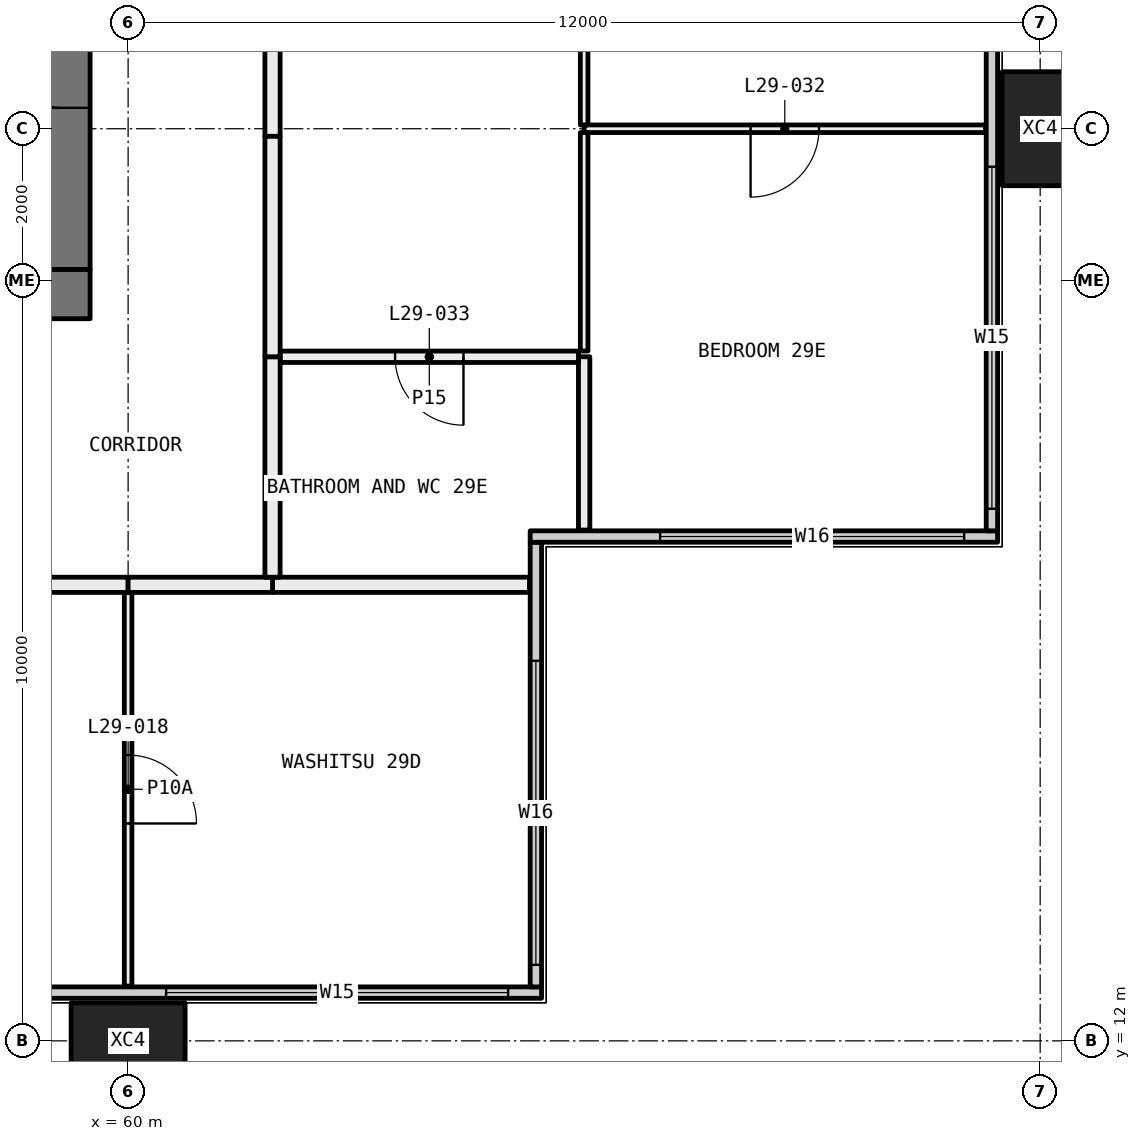
"""IFC4 building model, lengths in metres.
Left out: names, types, materials, properties, quantities, classifications, styles, units other than length and angle.
Written with IfcOpenShell. Run it as: python <this file> out.ifc"""

import sys

from ifc_helpers import new_model, si_unit, direction, frame, frame_2d, origin, origin_2d, place, context, subcontext, project, spatial, rectangle, hollow_rectangle, extrude, element, fill, save


model = new_model("IFC4")
c1 = context("Model", 3, precision=1e-05, world=origin(), true_north=direction((0.0, 1.0)))
c2 = subcontext(c1, "Body", "Model", "MODEL_VIEW")
j1 = project(units=[si_unit("LENGTHUNIT", "METRE"), si_unit("PLANEANGLEUNIT", "RADIAN")], contexts=[c1])
p1 = place(None, origin())
s1 = spatial("IfcSite", under=j1, at=p1, CompositionType="ELEMENT")
p2 = place(p1, origin())
s2 = spatial("IfcBuilding", under=s1, at=p2, CompositionType="ELEMENT")
p3 = place(p2, frame((0.0, 0.0, 113.85)))
s3 = spatial("IfcBuildingStorey", under=s2, at=p3, CompositionType="ELEMENT", Elevation=113.85)
for number, where, z_axis, x_axis in (
    (1, (60.0, 12.0, -0.4), (0.0, 0.0, 1.0), (1.0, 0.0, 0.0)),
    (2, (72.0, 24.0, -0.4), (0.0, 0.0, 1.0), (0.0, 1.0, 0.0)),
):
    element("IfcColumn", number, at=place(p3, frame(where, z_axis=z_axis, x_axis=x_axis)), inside=s3, PredefinedType="COLUMN", context=c2, shape_type="SweptSolid", body=[
        extrude(hollow_rectangle(XDim=1.5, YDim=1.0, WallThickness=0.06, at=origin_2d()), origin(), (0.0, 0.0, 1.0), 3.45),
    ])
p4 = place(p3, frame((6.56, 12.635, 0.0), z_axis=(0.0, 0.0, 1.0), x_axis=(1.0, 0.0, 0.0)))
e3 = element("IfcWall", 3, at=p4, inside=s3, PredefinedType="ELEMENTEDWALL", context=c2, shape_type="SweptSolid", body=[
    extrude(rectangle(XDim=58.88, YDim=0.15, at=frame_2d((29.44, 0.0))), origin(), (0.0, 0.0, 1.0), 3.05),
])
p5 = place(p4, frame((0.44, 0.0, 0.45)))
e4 = element("IfcOpeningElement", 4, at=p5, cuts=e3, PredefinedType="OPENING", context=c2, shape_type="SweptSolid", body=[
    extrude(rectangle(XDim=4.5, YDim=2.55, at=frame_2d((2.25, 1.275))), frame((0.0, 0.085, 0.0), z_axis=(0.0, -1.0, 0.0), x_axis=(1.0, 0.0, 0.0)), (0.0, 0.0, 1.0), 0.17),
])
p6 = place(p4, frame((8.19, 0.0, 0.45)))
e5 = element("IfcOpeningElement", 5, at=p6, cuts=e3, PredefinedType="OPENING", context=c2, shape_type="SweptSolid", body=[
    extrude(rectangle(XDim=2.75, YDim=2.55, at=frame_2d((1.375, 1.275))), frame((0.0, 0.085, 0.0), z_axis=(0.0, -1.0, 0.0), x_axis=(1.0, 0.0, 0.0)), (0.0, 0.0, 1.0), 0.17),
])
p7 = place(p4, frame((11.94, 0.0, 0.45)))
e6 = element("IfcOpeningElement", 6, at=p7, cuts=e3, PredefinedType="OPENING", context=c2, shape_type="SweptSolid", body=[
    extrude(rectangle(XDim=2.75, YDim=2.55, at=frame_2d((1.375, 1.275))), frame((0.0, 0.085, 0.0), z_axis=(0.0, -1.0, 0.0), x_axis=(1.0, 0.0, 0.0)), (0.0, 0.0, 1.0), 0.17),
])
p8 = place(p4, frame((20.19, 0.0, 0.45)))
e7 = element("IfcOpeningElement", 7, at=p8, cuts=e3, PredefinedType="OPENING", context=c2, shape_type="SweptSolid", body=[
    extrude(rectangle(XDim=2.75, YDim=2.55, at=frame_2d((1.375, 1.275))), frame((0.0, 0.085, 0.0), z_axis=(0.0, -1.0, 0.0), x_axis=(1.0, 0.0, 0.0)), (0.0, 0.0, 1.0), 0.17),
])
p9 = place(p4, frame((23.94, 0.0, 0.45)))
e8 = element("IfcOpeningElement", 8, at=p9, cuts=e3, PredefinedType="OPENING", context=c2, shape_type="SweptSolid", body=[
    extrude(rectangle(XDim=2.0, YDim=2.55, at=frame_2d((1.0, 1.275))), frame((0.0, 0.085, 0.0), z_axis=(0.0, -1.0, 0.0), x_axis=(1.0, 0.0, 0.0)), (0.0, 0.0, 1.0), 0.17),
])
p10 = place(p4, frame((32.19, 0.0, 0.45)))
e9 = element("IfcOpeningElement", 9, at=p10, cuts=e3, PredefinedType="OPENING", context=c2, shape_type="SweptSolid", body=[
    extrude(rectangle(XDim=2.75, YDim=2.55, at=frame_2d((1.375, 1.275))), frame((0.0, 0.085, 0.0), z_axis=(0.0, -1.0, 0.0), x_axis=(1.0, 0.0, 0.0)), (0.0, 0.0, 1.0), 0.17),
])
p11 = place(p4, frame((35.94, 0.0, 0.45)))
e10 = element("IfcOpeningElement", 10, at=p11, cuts=e3, PredefinedType="OPENING", context=c2, shape_type="SweptSolid", body=[
    extrude(rectangle(XDim=2.75, YDim=2.55, at=frame_2d((1.375, 1.275))), frame((0.0, 0.085, 0.0), z_axis=(0.0, -1.0, 0.0), x_axis=(1.0, 0.0, 0.0)), (0.0, 0.0, 1.0), 0.17),
])
p12 = place(p4, frame((44.19, 0.0, 0.45)))
e11 = element("IfcOpeningElement", 11, at=p12, cuts=e3, PredefinedType="OPENING", context=c2, shape_type="SweptSolid", body=[
    extrude(rectangle(XDim=2.75, YDim=2.55, at=frame_2d((1.375, 1.275))), frame((0.0, 0.085, 0.0), z_axis=(0.0, -1.0, 0.0), x_axis=(1.0, 0.0, 0.0)), (0.0, 0.0, 1.0), 0.17),
])
p13 = place(p4, frame((47.94, 0.0, 0.45)))
e12 = element("IfcOpeningElement", 12, at=p13, cuts=e3, PredefinedType="OPENING", context=c2, shape_type="SweptSolid", body=[
    extrude(rectangle(XDim=2.0, YDim=2.55, at=frame_2d((1.0, 1.275))), frame((0.0, 0.085, 0.0), z_axis=(0.0, -1.0, 0.0), x_axis=(1.0, 0.0, 0.0)), (0.0, 0.0, 1.0), 0.17),
])
p14 = place(p4, frame((53.94, 0.0, 0.45)))
e13 = element("IfcOpeningElement", 13, at=p14, cuts=e3, PredefinedType="OPENING", context=c2, shape_type="SweptSolid", body=[
    extrude(rectangle(XDim=4.5, YDim=2.55, at=frame_2d((2.25, 1.275))), frame((0.0, 0.085, 0.0), z_axis=(0.0, -1.0, 0.0), x_axis=(1.0, 0.0, 0.0)), (0.0, 0.0, 1.0), 0.17),
])
p15 = place(p3, frame((65.365, 12.71, 0.0), z_axis=(0.0, 0.0, 1.0), x_axis=(0.0, 1.0, 0.0)))
e14 = element("IfcWall", 14, at=p15, inside=s3, PredefinedType="ELEMENTEDWALL", context=c2, shape_type="SweptSolid", body=[
    extrude(rectangle(XDim=5.85, YDim=0.15, at=frame_2d((2.925, 0.0))), origin(), (0.0, 0.0, 1.0), 3.05),
])
p16 = place(p15, frame((0.29, 0.0, 0.45)))
e15 = element("IfcOpeningElement", 15, at=p16, cuts=e14, PredefinedType="OPENING", context=c2, shape_type="SweptSolid", body=[
    extrude(rectangle(XDim=4.0, YDim=2.55, at=frame_2d((2.0, 1.275))), frame((0.0, 0.085, 0.0), z_axis=(0.0, -1.0, 0.0), x_axis=(1.0, 0.0, 0.0)), (0.0, 0.0, 1.0), 0.17),
])
p17 = place(p3, frame((65.29, 18.635, 0.0), z_axis=(0.0, 0.0, 1.0), x_axis=(1.0, 0.0, 0.0)))
e16 = element("IfcWall", 16, at=p17, inside=s3, PredefinedType="ELEMENTEDWALL", context=c2, shape_type="SweptSolid", body=[
    extrude(rectangle(XDim=6.15, YDim=0.15, at=frame_2d((3.075, 0.0))), origin(), (0.0, 0.0, 1.0), 3.05),
])
p18 = place(p17, frame((1.71, 0.0, 0.45)))
e17 = element("IfcOpeningElement", 17, at=p18, cuts=e16, PredefinedType="OPENING", context=c2, shape_type="SweptSolid", body=[
    extrude(rectangle(XDim=4.0, YDim=2.55, at=frame_2d((2.0, 1.275))), frame((0.0, 0.085, 0.0), z_axis=(0.0, -1.0, 0.0), x_axis=(1.0, 0.0, 0.0)), (0.0, 0.0, 1.0), 0.17),
])
p19 = place(p3, frame((71.365, 18.71, 0.0), z_axis=(0.0, 0.0, 1.0), x_axis=(0.0, 1.0, 0.0)))
e18 = element("IfcWall", 18, at=p19, inside=s3, PredefinedType="ELEMENTEDWALL", context=c2, shape_type="SweptSolid", body=[
    extrude(rectangle(XDim=22.58, YDim=0.15, at=frame_2d((11.29, 0.0))), origin(), (0.0, 0.0, 1.0), 3.05),
])
p20 = place(p19, frame((0.29, 0.0, 0.45)))
e19 = element("IfcOpeningElement", 19, at=p20, cuts=e18, PredefinedType="OPENING", context=c2, shape_type="SweptSolid", body=[
    extrude(rectangle(XDim=4.5, YDim=2.55, at=frame_2d((2.25, 1.275))), frame((0.0, 0.085, 0.0), z_axis=(0.0, -1.0, 0.0), x_axis=(1.0, 0.0, 0.0)), (0.0, 0.0, 1.0), 0.17),
])
p21 = place(p19, frame((8.04, 0.0, 0.45)))
e20 = element("IfcOpeningElement", 20, at=p21, cuts=e18, PredefinedType="OPENING", context=c2, shape_type="SweptSolid", body=[
    extrude(rectangle(XDim=2.75, YDim=2.55, at=frame_2d((1.375, 1.275))), frame((0.0, 0.085, 0.0), z_axis=(0.0, -1.0, 0.0), x_axis=(1.0, 0.0, 0.0)), (0.0, 0.0, 1.0), 0.17),
])
p22 = place(p19, frame((11.79, 0.0, 0.45)))
e21 = element("IfcOpeningElement", 21, at=p22, cuts=e18, PredefinedType="OPENING", context=c2, shape_type="SweptSolid", body=[
    extrude(rectangle(XDim=2.0, YDim=2.55, at=frame_2d((1.0, 1.275))), frame((0.0, 0.085, 0.0), z_axis=(0.0, -1.0, 0.0), x_axis=(1.0, 0.0, 0.0)), (0.0, 0.0, 1.0), 0.17),
])
p23 = place(p19, frame((17.79, 0.0, 0.45)))
e22 = element("IfcOpeningElement", 22, at=p23, cuts=e18, PredefinedType="OPENING", context=c2, shape_type="SweptSolid", body=[
    extrude(rectangle(XDim=4.5, YDim=2.55, at=frame_2d((2.25, 1.275))), frame((0.0, 0.085, 0.0), z_axis=(0.0, -1.0, 0.0), x_axis=(1.0, 0.0, 0.0)), (0.0, 0.0, 1.0), 0.17),
])
p24 = place(p3, frame((60.0, 12.72, 0.0), z_axis=(0.0, 0.0, 1.0), x_axis=(0.0, 1.0, 0.0)))
e23 = element("IfcWall", 23, at=p24, inside=s3, PredefinedType="PARTITIONING", context=c2, shape_type="SweptSolid", body=[
    extrude(rectangle(XDim=5.18, YDim=0.1, at=frame_2d((2.59, 0.0))), origin(), (0.0, 0.0, 1.0), 3.05),
])
p25 = place(p24, frame((2.14, 0.0, 0.0)))
e24 = element("IfcOpeningElement", 24, at=p25, cuts=e23, PredefinedType="OPENING", context=c2, shape_type="SweptSolid", body=[
    extrude(rectangle(XDim=0.9, YDim=2.1, at=frame_2d((0.45, 1.05))), frame((0.0, 0.06, 0.0), z_axis=(0.0, -1.0, 0.0), x_axis=(1.0, 0.0, 0.0)), (0.0, 0.0, 1.0), 0.12),
])
p26 = place(p3, frame((60.0, 18.0, 0.0), z_axis=(0.0, 0.0, 1.0), x_axis=(-1.0, 0.0, 0.0)))
e25 = element("IfcWall", 25, at=p26, inside=s3, PredefinedType="PARTITIONING", context=c2, shape_type="SweptSolid", body=[
    extrude(rectangle(XDim=6.0, YDim=0.2, at=frame_2d((3.0, 0.0))), origin(), (0.0, 0.0, 1.0), 3.05),
])
p27 = place(p3, frame((65.28, 18.0, 0.0), z_axis=(0.0, 0.0, 1.0), x_axis=(-1.0, 0.0, 0.0)))
e26 = element("IfcWall", 26, at=p27, inside=s3, PredefinedType="PARTITIONING", context=c2, shape_type="SweptSolid", body=[
    extrude(rectangle(XDim=3.38, YDim=0.2, at=frame_2d((1.69, 0.0))), origin(), (0.0, 0.0, 1.0), 3.05),
])
p28 = place(p3, frame((61.9, 18.0, 0.0), z_axis=(0.0, 0.0, 1.0), x_axis=(-1.0, 0.0, 0.0)))
e27 = element("IfcWall", 27, at=p28, inside=s3, PredefinedType="PARTITIONING", context=c2, shape_type="SweptSolid", body=[
    extrude(rectangle(XDim=1.9, YDim=0.2, at=frame_2d((0.95, 0.0))), origin(), (0.0, 0.0, 1.0), 3.05),
])
p29 = place(p3, frame((71.28, 24.0, 0.0), z_axis=(0.0, 0.0, 1.0), x_axis=(-1.0, 0.0, 0.0)))
e28 = element("IfcWall", 28, at=p29, inside=s3, PredefinedType="PARTITIONING", context=c2, shape_type="SweptSolid", body=[
    extrude(rectangle(XDim=5.28, YDim=0.1, at=frame_2d((2.64, 0.0))), origin(), (0.0, 0.0, 1.0), 2.45),
])
p30 = place(p29, frame((2.19, 0.0, 0.0)))
e29 = element("IfcOpeningElement", 29, at=p30, cuts=e28, PredefinedType="OPENING", context=c2, shape_type="SweptSolid", body=[
    extrude(rectangle(XDim=0.9, YDim=2.1, at=frame_2d((0.45, 1.05))), frame((0.0, 0.06, 0.0), z_axis=(0.0, -1.0, 0.0), x_axis=(1.0, 0.0, 0.0)), (0.0, 0.0, 1.0), 0.12),
])
p31 = place(p3, frame((66.0, 21.0, 0.0), z_axis=(0.0, 0.0, 1.0), x_axis=(0.0, -1.0, 0.0)))
e30 = element("IfcWall", 30, at=p31, inside=s3, PredefinedType="PARTITIONING", context=c2, shape_type="SweptSolid", body=[
    extrude(rectangle(XDim=2.28, YDim=0.15, at=frame_2d((1.14, 0.0))), origin(), (0.0, 0.0, 1.0), 3.05),
])
p32 = place(p3, frame((66.0, 23.95, 0.0), z_axis=(0.0, 0.0, 1.0), x_axis=(0.0, -1.0, 0.0)))
e31 = element("IfcWall", 31, at=p32, inside=s3, PredefinedType="PARTITIONING", context=c2, shape_type="SweptSolid", body=[
    extrude(rectangle(XDim=2.875, YDim=0.1, at=frame_2d((1.438, 0.0))), origin(), (0.0, 0.0, 1.0), 2.45),
])
p33 = place(p3, frame((66.0, 29.95, 0.0), z_axis=(0.0, 0.0, 1.0), x_axis=(0.0, -1.0, 0.0)))
e32 = element("IfcWall", 32, at=p33, inside=s3, PredefinedType="PARTITIONING", context=c2, shape_type="SweptSolid", body=[
    extrude(rectangle(XDim=5.9, YDim=0.1, at=frame_2d((2.95, 0.0))), origin(), (0.0, 0.0, 1.0), 2.45),
])
p34 = place(p3, frame((65.925, 21.0, 0.0), z_axis=(0.0, 0.0, 1.0), x_axis=(-1.0, 0.0, 0.0)))
e33 = element("IfcWall", 33, at=p34, inside=s3, PredefinedType="PARTITIONING", context=c2, shape_type="SweptSolid", body=[
    extrude(rectangle(XDim=3.925, YDim=0.15, at=frame_2d((1.962, 0.0))), origin(), (0.0, 0.0, 1.0), 3.05),
])
p35 = place(p34, frame((1.512, 0.0, 0.0)))
e34 = element("IfcOpeningElement", 34, at=p35, cuts=e33, PredefinedType="OPENING", context=c2, shape_type="SweptSolid", body=[
    extrude(rectangle(XDim=0.9, YDim=2.1, at=frame_2d((0.45, 1.05))), frame((0.0, 0.085, 0.0), z_axis=(0.0, -1.0, 0.0), x_axis=(1.0, 0.0, 0.0)), (0.0, 0.0, 1.0), 0.17),
])
p36 = place(p3, frame((61.9, 21.0, 0.0), z_axis=(0.0, 0.0, 1.0), x_axis=(0.0, -1.0, 0.0)))
e35 = element("IfcWall", 35, at=p36, inside=s3, PredefinedType="PARTITIONING", context=c2, shape_type="SweptSolid", body=[
    extrude(rectangle(XDim=2.9, YDim=0.2, at=frame_2d((1.45, 0.0))), origin(), (0.0, 0.0, 1.0), 3.05),
])
p37 = place(p3, frame((61.9, 33.0, 0.0), z_axis=(0.0, 0.0, 1.0), x_axis=(0.0, -1.0, 0.0)))
e36 = element("IfcWall", 36, at=p37, inside=s3, PredefinedType="PARTITIONING", context=c2, shape_type="SweptSolid", body=[
    extrude(rectangle(XDim=9.1, YDim=0.2, at=frame_2d((4.55, 0.0))), origin(), (0.0, 0.0, 1.0), 2.45),
])
p38 = place(p3, frame((61.9, 23.9, 0.0), z_axis=(0.0, 0.0, 1.0), x_axis=(0.0, -1.0, 0.0)))
e37 = element("IfcWall", 37, at=p38, inside=s3, PredefinedType="PARTITIONING", context=c2, shape_type="SweptSolid", body=[
    extrude(rectangle(XDim=2.9, YDim=0.2, at=frame_2d((1.45, 0.0))), origin(), (0.0, 0.0, 1.0), 3.05),
])
p39 = place(p3, frame((59.5, 21.825, 0.0), z_axis=(0.0, 0.0, 1.0), x_axis=(-1.0, 0.0, 0.0)))
e38 = element("IfcWall", 38, at=p39, inside=s3, PredefinedType="SHEAR", context=c2, shape_type="SweptSolid", body=[
    extrude(rectangle(XDim=11.0, YDim=0.65, at=frame_2d((5.5, 0.0))), origin(), (0.0, 0.0, 1.0), 3.05),
])
p40 = place(p3, frame((59.175, 22.15, 0.0), z_axis=(0.0, 0.0, 1.0), x_axis=(0.0, 1.0, 0.0)))
e39 = element("IfcWall", 39, at=p40, inside=s3, PredefinedType="SHEAR", context=c2, shape_type="SweptSolid", body=[
    extrude(rectangle(XDim=15.7, YDim=0.65, at=frame_2d((7.85, 0.0))), origin(), (0.0, 0.0, 1.0), 3.05),
])
p41 = place(p40, frame((8.3, 0.0, 0.0)))
e40 = element("IfcOpeningElement", 40, at=p41, cuts=e39, PredefinedType="OPENING", context=c2, shape_type="SweptSolid", body=[
    extrude(rectangle(XDim=1.6, YDim=2.1, at=frame_2d((0.8, 1.05))), frame((0.0, 0.335, 0.0), z_axis=(0.0, -1.0, 0.0), x_axis=(1.0, 0.0, 0.0)), (0.0, 0.0, 1.0), 0.67),
])
p42 = place(p40, frame((2.125, 0.0, 0.0)))
e41 = element("IfcOpeningElement", 41, at=p42, cuts=e39, PredefinedType="OPENING", context=c2, shape_type="SweptSolid", body=[
    extrude(rectangle(XDim=1.0, YDim=2.1, at=frame_2d((0.5, 1.05))), frame((0.0, 0.335, 0.0), z_axis=(0.0, -1.0, 0.0), x_axis=(1.0, 0.0, 0.0)), (0.0, 0.0, 1.0), 0.67),
])
p43 = place(p14, origin())
e42 = element("IfcWindow", 42, at=p43, inside=s3, PartitioningType="SINGLE_PANEL", PredefinedType="WINDOW", context=c2, shape_type="SweptSolid", body=[
    extrude(rectangle(XDim=4.5, YDim=2.55, at=frame_2d((2.25, 1.275))), frame((0.0, 0.03, 0.0), z_axis=(0.0, -1.0, 0.0), x_axis=(1.0, 0.0, 0.0)), (0.0, 0.0, 1.0), 0.06),
])
fill(e13, e42)
p44 = place(p16, origin())
e43 = element("IfcWindow", 43, at=p44, inside=s3, PartitioningType="SINGLE_PANEL", PredefinedType="WINDOW", context=c2, shape_type="SweptSolid", body=[
    extrude(rectangle(XDim=4.0, YDim=2.55, at=frame_2d((2.0, 1.275))), frame((0.0, 0.03, 0.0), z_axis=(0.0, -1.0, 0.0), x_axis=(1.0, 0.0, 0.0)), (0.0, 0.0, 1.0), 0.06),
])
fill(e15, e43)
p45 = place(p18, origin())
e44 = element("IfcWindow", 44, at=p45, inside=s3, PartitioningType="SINGLE_PANEL", PredefinedType="WINDOW", context=c2, shape_type="SweptSolid", body=[
    extrude(rectangle(XDim=4.0, YDim=2.55, at=frame_2d((2.0, 1.275))), frame((0.0, 0.03, 0.0), z_axis=(0.0, -1.0, 0.0), x_axis=(1.0, 0.0, 0.0)), (0.0, 0.0, 1.0), 0.06),
])
fill(e17, e44)
p46 = place(p20, origin())
e45 = element("IfcWindow", 45, at=p46, inside=s3, PartitioningType="SINGLE_PANEL", PredefinedType="WINDOW", context=c2, shape_type="SweptSolid", body=[
    extrude(rectangle(XDim=4.5, YDim=2.55, at=frame_2d((2.25, 1.275))), frame((0.0, 0.03, 0.0), z_axis=(0.0, -1.0, 0.0), x_axis=(1.0, 0.0, 0.0)), (0.0, 0.0, 1.0), 0.06),
])
fill(e19, e45)
p47 = place(p25, frame((0.9, 0.0, 0.0), x_axis=(-1.0, 0.0, 0.0)))
e46 = element("IfcDoor", 46, at=p47, inside=s3, OperationType="SINGLE_SWING_LEFT", PredefinedType="DOOR", context=c2, shape_type="SweptSolid", body=[
    extrude(rectangle(XDim=0.9, YDim=2.1, at=frame_2d((0.45, 1.05))), frame((0.0, 0.025, 0.0), z_axis=(0.0, -1.0, 0.0), x_axis=(1.0, 0.0, 0.0)), (0.0, 0.0, 1.0), 0.05),
])
fill(e24, e46)
p48 = place(p30, origin())
e47 = element("IfcDoor", 47, at=p48, inside=s3, OperationType="SINGLE_SWING_LEFT", PredefinedType="DOOR", context=c2, shape_type="SweptSolid", body=[
    extrude(rectangle(XDim=0.9, YDim=2.1, at=frame_2d((0.45, 1.05))), frame((0.0, 0.025, 0.0), z_axis=(0.0, -1.0, 0.0), x_axis=(1.0, 0.0, 0.0)), (0.0, 0.0, 1.0), 0.05),
])
fill(e29, e47)
p49 = place(p35, origin())
e48 = element("IfcDoor", 48, at=p49, inside=s3, OperationType="SINGLE_SWING_RIGHT", PredefinedType="DOOR", context=c2, shape_type="SweptSolid", body=[
    extrude(rectangle(XDim=0.9, YDim=2.1, at=frame_2d((0.45, 1.05))), frame((0.0, 0.025, 0.0), z_axis=(0.0, -1.0, 0.0), x_axis=(1.0, 0.0, 0.0)), (0.0, 0.0, 1.0), 0.05),
])
fill(e34, e48)
p50 = place(p42, origin())
e49 = element("IfcDoor", 49, at=p50, inside=s3, OperationType="SINGLE_SWING_LEFT", PredefinedType="DOOR", context=c2, shape_type="SweptSolid", body=[
    extrude(rectangle(XDim=1.0, YDim=2.1, at=frame_2d((0.5, 1.05))), frame((0.0, 0.025, 0.0), z_axis=(0.0, -1.0, 0.0), x_axis=(1.0, 0.0, 0.0)), (0.0, 0.0, 1.0), 0.05),
])
fill(e41, e49)
save(model, sys.argv[1])
